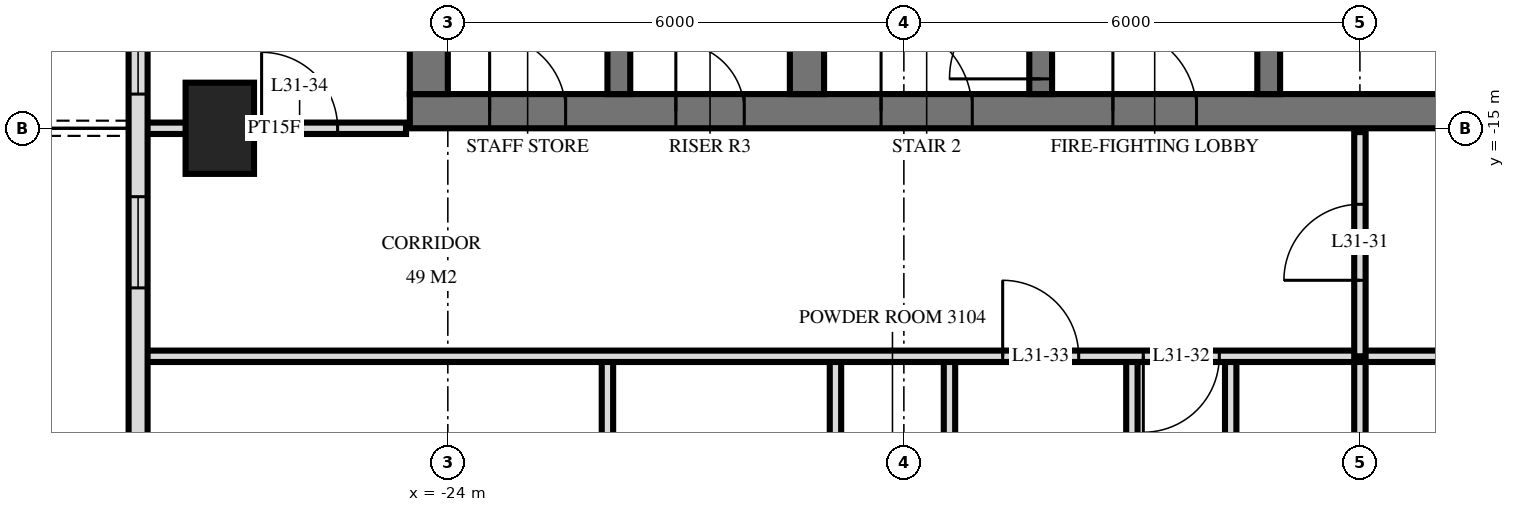
"""IFC4 building model, lengths in metres.
Left out: names, types, materials, properties, quantities, classifications, styles, units other than length and angle.
Written with IfcOpenShell. Run it as: python <this file> out.ifc"""

import sys

from ifc_helpers import new_model, si_unit, direction, frame, frame_2d, origin, origin_2d, place, context, subcontext, project, spatial, rectangle, extrude, element, fill, save


model = new_model("IFC4")
c1 = context("Model", 3, precision=1e-05, world=origin(), true_north=direction((0.0, 1.0)))
c2 = subcontext(c1, "Body", "Model", "MODEL_VIEW")
j1 = project(units=[si_unit("LENGTHUNIT", "METRE"), si_unit("PLANEANGLEUNIT", "RADIAN")], contexts=[c1])
p1 = place(None, origin())
s1 = spatial("IfcSite", under=j1, at=p1, CompositionType="ELEMENT")
p2 = place(p1, origin())
s2 = spatial("IfcBuilding", under=s1, at=p2, CompositionType="ELEMENT")
p3 = place(p2, frame((0.0, 0.0, 123.6)))
s3 = spatial("IfcBuildingStorey", under=s2, at=p3, CompositionType="ELEMENT", Elevation=123.6)
p4 = place(p3, frame((-27.0, -15.0, 0.0), z_axis=(0.0, 0.0, 1.0), x_axis=(0.0, 1.0, 0.0)))
e1 = element("IfcColumn", 1, at=p4, inside=s3, PredefinedType="COLUMN", context=c2, shape_type="SweptSolid", body=[
    extrude(rectangle(XDim=1.2, YDim=0.9, at=origin_2d()), origin(), (0.0, 0.0, 1.0), 3.6),
])
p5 = place(p3, frame((-24.5, -14.775, 0.0), z_axis=(0.0, 0.0, 1.0), x_axis=(1.0, 0.0, 0.0)))
e2 = element("IfcWall", 2, at=p5, inside=s3, PredefinedType="SHEAR", context=c2, shape_type="SweptSolid", body=[
    extrude(rectangle(XDim=14.5, YDim=0.45, at=frame_2d((7.25, 0.0))), origin(), (0.0, 0.0, 1.0), 3.6),
])
p6 = place(p5, frame((6.2, 0.0, 0.0)))
e3 = element("IfcOpeningElement", 3, at=p6, cuts=e2, PredefinedType="OPENING", context=c2, shape_type="SweptSolid", body=[
    extrude(rectangle(XDim=1.2, YDim=2.1, at=frame_2d((0.6, 1.05))), frame((0.0, 0.235, 0.0), z_axis=(0.0, -1.0, 0.0), x_axis=(1.0, 0.0, 0.0)), (0.0, 0.0, 1.0), 0.47),
])
p7 = place(p5, frame((9.25, 0.0, 0.0)))
e4 = element("IfcOpeningElement", 4, at=p7, cuts=e2, PredefinedType="OPENING", context=c2, shape_type="SweptSolid", body=[
    extrude(rectangle(XDim=1.1, YDim=2.1, at=frame_2d((0.55, 1.05))), frame((0.0, 0.235, 0.0), z_axis=(0.0, -1.0, 0.0), x_axis=(1.0, 0.0, 0.0)), (0.0, 0.0, 1.0), 0.47),
])
p8 = place(p5, frame((3.5, 0.0, 0.0)))
e5 = element("IfcOpeningElement", 5, at=p8, cuts=e2, PredefinedType="OPENING", context=c2, shape_type="SweptSolid", body=[
    extrude(rectangle(XDim=0.9, YDim=2.1, at=frame_2d((0.45, 1.05))), frame((0.0, 0.235, 0.0), z_axis=(0.0, -1.0, 0.0), x_axis=(1.0, 0.0, 0.0)), (0.0, 0.0, 1.0), 0.47),
])
p9 = place(p5, frame((1.05, 0.0, 0.0)))
e6 = element("IfcOpeningElement", 6, at=p9, cuts=e2, PredefinedType="OPENING", context=c2, shape_type="SweptSolid", body=[
    extrude(rectangle(XDim=1.0, YDim=2.1, at=frame_2d((0.5, 1.05))), frame((0.0, 0.235, 0.0), z_axis=(0.0, -1.0, 0.0), x_axis=(1.0, 0.0, 0.0)), (0.0, 0.0, 1.0), 0.47),
])
p10 = place(p3, frame((-24.25, -14.55, 0.0), z_axis=(0.0, 0.0, 1.0), x_axis=(0.0, 1.0, 0.0)))
e7 = element("IfcWall", 7, at=p10, inside=s3, PredefinedType="SHEAR", context=c2, shape_type="SweptSolid", body=[
    extrude(rectangle(XDim=14.1, YDim=0.5, at=frame_2d((7.05, 0.0))), origin(), (0.0, 0.0, 1.0), 3.6),
])
p11 = place(p3, frame((-13.2, -14.55, 0.0), z_axis=(0.0, 0.0, 1.0), x_axis=(0.0, 1.0, 0.0)))
e8 = element("IfcWall", 8, at=p11, inside=s3, PredefinedType="SHEAR", context=c2, shape_type="SweptSolid", body=[
    extrude(rectangle(XDim=5.4, YDim=0.3, at=frame_2d((2.7, 0.0))), origin(), (0.0, 0.0, 1.0), 3.6),
])
p12 = place(p11, frame((4.0, 0.0, 0.0)))
e9 = element("IfcOpeningElement", 9, at=p12, cuts=e8, PredefinedType="OPENING", context=c2, shape_type="SweptSolid", body=[
    extrude(rectangle(XDim=1.2, YDim=2.1, at=frame_2d((0.6, 1.05))), frame((0.0, 0.16, 0.0), z_axis=(0.0, -1.0, 0.0), x_axis=(1.0, 0.0, 0.0)), (0.0, 0.0, 1.0), 0.32),
])
p13 = place(p3, frame((-16.2, -14.55, 0.0), z_axis=(0.0, 0.0, 1.0), x_axis=(0.0, 1.0, 0.0)))
e10 = element("IfcWall", 10, at=p13, inside=s3, PredefinedType="SHEAR", context=c2, shape_type="SweptSolid", body=[
    extrude(rectangle(XDim=5.4, YDim=0.3, at=frame_2d((2.7, 0.0))), origin(), (0.0, 0.0, 1.0), 3.6),
])
p14 = place(p13, frame((0.2, 0.0, 0.0)))
e11 = element("IfcOpeningElement", 11, at=p14, cuts=e10, PredefinedType="OPENING", context=c2, shape_type="SweptSolid", body=[
    extrude(rectangle(XDim=1.2, YDim=2.1, at=frame_2d((0.6, 1.05))), frame((0.0, 0.16, 0.0), z_axis=(0.0, -1.0, 0.0), x_axis=(1.0, 0.0, 0.0)), (0.0, 0.0, 1.0), 0.32),
])
p15 = place(p3, frame((-19.275, -14.55, 0.0), z_axis=(0.0, 0.0, 1.0), x_axis=(0.0, 1.0, 0.0)))
e12 = element("IfcWall", 12, at=p15, inside=s3, PredefinedType="SHEAR", context=c2, shape_type="SweptSolid", body=[
    extrude(rectangle(XDim=5.4, YDim=0.45, at=frame_2d((2.7, 0.0))), origin(), (0.0, 0.0, 1.0), 3.6),
])
p16 = place(p3, frame((-21.75, -14.55, 0.0), z_axis=(0.0, 0.0, 1.0), x_axis=(0.0, 1.0, 0.0)))
e13 = element("IfcWall", 13, at=p16, inside=s3, PredefinedType="SHEAR", context=c2, shape_type="SweptSolid", body=[
    extrude(rectangle(XDim=5.4, YDim=0.3, at=frame_2d((2.7, 0.0))), origin(), (0.0, 0.0, 1.0), 3.6),
])
p17 = place(p3, frame((-28.075, -3.325, 0.0), z_axis=(0.0, 0.0, 1.0), x_axis=(0.0, -1.0, 0.0)))
e14 = element("IfcWall", 14, at=p17, inside=s3, PredefinedType="SOLIDWALL", context=c2, shape_type="SweptSolid", body=[
    extrude(rectangle(XDim=25.951, YDim=0.25, at=frame_2d((12.975, 0.0))), origin(), (0.0, 0.0, 1.0), 3.32),
])
p18 = place(p17, frame((6.575, 0.0, 0.0)))
e15 = element("IfcOpeningElement", 15, at=p18, cuts=e14, PredefinedType="OPENING", context=c2, shape_type="SweptSolid", body=[
    extrude(rectangle(XDim=1.8, YDim=2.4, at=frame_2d((0.9, 1.2))), frame((0.0, 0.135, 0.0), z_axis=(0.0, -1.0, 0.0), x_axis=(1.0, 0.0, 0.0)), (0.0, 0.0, 1.0), 0.27),
])
p19 = place(p17, frame((9.425, 0.0, 0.3)))
e16 = element("IfcOpeningElement", 16, at=p19, cuts=e14, PredefinedType="OPENING", context=c2, shape_type="SweptSolid", body=[
    extrude(rectangle(XDim=1.8, YDim=2.1, at=frame_2d((0.9, 1.05))), frame((0.0, 0.135, 0.0), z_axis=(0.0, -1.0, 0.0), x_axis=(1.0, 0.0, 0.0)), (0.0, 0.0, 1.0), 0.27),
])
p20 = place(p17, frame((12.575, 0.0, 0.3)))
e17 = element("IfcOpeningElement", 17, at=p20, cuts=e14, PredefinedType="OPENING", context=c2, shape_type="SweptSolid", body=[
    extrude(rectangle(XDim=1.2, YDim=2.1, at=frame_2d((0.6, 1.05))), frame((0.0, 0.135, 0.0), z_axis=(0.0, -1.0, 0.0), x_axis=(1.0, 0.0, 0.0)), (0.0, 0.0, 1.0), 0.27),
])
p21 = place(p17, frame((15.875, 0.0, 0.0)))
e18 = element("IfcOpeningElement", 18, at=p21, cuts=e14, PredefinedType="OPENING", context=c2, shape_type="SweptSolid", body=[
    extrude(rectangle(XDim=1.8, YDim=2.4, at=frame_2d((0.9, 1.2))), frame((0.0, 0.135, 0.0), z_axis=(0.0, -1.0, 0.0), x_axis=(1.0, 0.0, 0.0)), (0.0, 0.0, 1.0), 0.27),
])
p22 = place(p17, frame((21.075, 0.0, 0.0)))
e19 = element("IfcOpeningElement", 19, at=p22, cuts=e14, PredefinedType="OPENING", context=c2, shape_type="SweptSolid", body=[
    extrude(rectangle(XDim=1.8, YDim=2.4, at=frame_2d((0.9, 1.2))), frame((0.0, 0.135, 0.0), z_axis=(0.0, -1.0, 0.0), x_axis=(1.0, 0.0, 0.0)), (0.0, 0.0, 1.0), 0.27),
])
p23 = place(p17, frame((23.825, 0.0, 0.3)))
e20 = element("IfcOpeningElement", 20, at=p23, cuts=e14, PredefinedType="OPENING", context=c2, shape_type="SweptSolid", body=[
    extrude(rectangle(XDim=1.8, YDim=2.1, at=frame_2d((0.9, 1.05))), frame((0.0, 0.135, 0.0), z_axis=(0.0, -1.0, 0.0), x_axis=(1.0, 0.0, 0.0)), (0.0, 0.0, 1.0), 0.27),
])
p24 = place(p3, frame((-12.0, -18.0, 0.0), z_axis=(0.0, 0.0, 1.0), x_axis=(0.0, 1.0, 0.0)))
e21 = element("IfcWall", 21, at=p24, inside=s3, PredefinedType="PARTITIONING", context=c2, shape_type="SweptSolid", body=[
    extrude(rectangle(XDim=2.95, YDim=0.15, at=frame_2d((1.475, 0.0))), origin(), (0.0, 0.0, 1.0), 3.32),
])
p25 = place(p24, frame((1.0, 0.0, 0.0)))
e22 = element("IfcOpeningElement", 22, at=p25, cuts=e21, PredefinedType="OPENING", context=c2, shape_type="SweptSolid", body=[
    extrude(rectangle(XDim=1.0, YDim=2.1, at=frame_2d((0.5, 1.05))), frame((0.0, 0.085, 0.0), z_axis=(0.0, -1.0, 0.0), x_axis=(1.0, 0.0, 0.0)), (0.0, 0.0, 1.0), 0.17),
])
p26 = place(p3, frame((-12.0, -33.62, 0.0), z_axis=(0.0, 0.0, 1.0), x_axis=(0.0, 1.0, 0.0)))
e23 = element("IfcWall", 23, at=p26, inside=s3, PredefinedType="PARTITIONING", context=c2, shape_type="SweptSolid", body=[
    extrude(rectangle(XDim=15.62, YDim=0.15, at=frame_2d((7.81, 0.0))), origin(), (0.0, 0.0, 1.0), 3.32),
])
p27 = place(p3, frame((-13.7, -23.0, 0.0), z_axis=(0.0, 0.0, 1.0), x_axis=(0.0, 1.0, 0.0)))
e24 = element("IfcWall", 24, at=p27, inside=s3, PredefinedType="PARTITIONING", context=c2, shape_type="SweptSolid", body=[
    extrude(rectangle(XDim=5.0, YDim=0.15, at=frame_2d((2.5, 0.0))), origin(), (0.0, 0.0, 1.0), 3.32),
])
p28 = place(p27, frame((2.12, 0.0, 0.0)))
e25 = element("IfcOpeningElement", 25, at=p28, cuts=e24, PredefinedType="OPENING", context=c2, shape_type="SweptSolid", body=[
    extrude(rectangle(XDim=0.8, YDim=2.1, at=frame_2d((0.4, 1.05))), frame((0.0, 0.085, 0.0), z_axis=(0.0, -1.0, 0.0), x_axis=(1.0, 0.0, 0.0)), (0.0, 0.0, 1.0), 0.17),
])
p29 = place(p3, frame((-15.0, -22.2, 0.0), z_axis=(0.0, 0.0, 1.0), x_axis=(0.0, 1.0, 0.0)))
e26 = element("IfcWall", 26, at=p29, inside=s3, PredefinedType="PARTITIONING", context=c2, shape_type="SweptSolid", body=[
    extrude(rectangle(XDim=4.2, YDim=0.15, at=frame_2d((2.1, 0.0))), origin(), (0.0, 0.0, 1.0), 3.32),
])
p30 = place(p3, frame((-17.4, -22.2, 0.0), z_axis=(0.0, 0.0, 1.0), x_axis=(0.0, 1.0, 0.0)))
e27 = element("IfcWall", 27, at=p30, inside=s3, PredefinedType="PARTITIONING", context=c2, shape_type="SweptSolid", body=[
    extrude(rectangle(XDim=4.2, YDim=0.15, at=frame_2d((2.1, 0.0))), origin(), (0.0, 0.0, 1.0), 3.32),
])
p31 = place(p30, frame((1.58, 0.0, 0.0)))
e28 = element("IfcOpeningElement", 28, at=p31, cuts=e27, PredefinedType="OPENING", context=c2, shape_type="SweptSolid", body=[
    extrude(rectangle(XDim=1.0, YDim=2.1, at=frame_2d((0.5, 1.05))), frame((0.0, 0.085, 0.0), z_axis=(0.0, -1.0, 0.0), x_axis=(1.0, 0.0, 0.0)), (0.0, 0.0, 1.0), 0.17),
])
p32 = place(p3, frame((-18.9, -22.2, 0.0), z_axis=(0.0, 0.0, 1.0), x_axis=(0.0, 1.0, 0.0)))
e29 = element("IfcWall", 29, at=p32, inside=s3, PredefinedType="PLUMBINGWALL", context=c2, shape_type="SweptSolid", body=[
    extrude(rectangle(XDim=4.2, YDim=0.15, at=frame_2d((2.1, 0.0))), origin(), (0.0, 0.0, 1.0), 3.32),
])
p33 = place(p3, frame((-21.9, -22.2, 0.0), z_axis=(0.0, 0.0, 1.0), x_axis=(0.0, 1.0, 0.0)))
e30 = element("IfcWall", 30, at=p33, inside=s3, PredefinedType="PARTITIONING", context=c2, shape_type="SweptSolid", body=[
    extrude(rectangle(XDim=4.2, YDim=0.15, at=frame_2d((2.1, 0.0))), origin(), (0.0, 0.0, 1.0), 3.32),
])
p34 = place(p3, frame((-28.02, -18.0, 0.0), z_axis=(0.0, 0.0, 1.0), x_axis=(1.0, 0.0, 0.0)))
e31 = element("IfcWall", 31, at=p34, inside=s3, PredefinedType="PARTITIONING", context=c2, shape_type="SweptSolid", body=[
    extrude(rectangle(XDim=56.04, YDim=0.15, at=frame_2d((28.02, 0.0))), origin(), (0.0, 0.0, 1.0), 3.32),
])
p35 = place(p34, frame((13.17, 0.0, 0.0)))
e32 = element("IfcOpeningElement", 32, at=p35, cuts=e31, PredefinedType="OPENING", context=c2, shape_type="SweptSolid", body=[
    extrude(rectangle(XDim=1.0, YDim=2.1, at=frame_2d((0.5, 1.05))), frame((0.0, 0.085, 0.0), z_axis=(0.0, -1.0, 0.0), x_axis=(1.0, 0.0, 0.0)), (0.0, 0.0, 1.0), 0.17),
])
p36 = place(p34, frame((11.32, 0.0, 0.0)))
e33 = element("IfcOpeningElement", 33, at=p36, cuts=e31, PredefinedType="OPENING", context=c2, shape_type="SweptSolid", body=[
    extrude(rectangle(XDim=1.0, YDim=2.1, at=frame_2d((0.5, 1.05))), frame((0.0, 0.085, 0.0), z_axis=(0.0, -1.0, 0.0), x_axis=(1.0, 0.0, 0.0)), (0.0, 0.0, 1.0), 0.17),
])
p37 = place(p34, frame((41.87, 0.0, 0.0)))
e34 = element("IfcOpeningElement", 34, at=p37, cuts=e31, PredefinedType="OPENING", context=c2, shape_type="SweptSolid", body=[
    extrude(rectangle(XDim=1.0, YDim=2.1, at=frame_2d((0.5, 1.05))), frame((0.0, 0.085, 0.0), z_axis=(0.0, -1.0, 0.0), x_axis=(1.0, 0.0, 0.0)), (0.0, 0.0, 1.0), 0.17),
])
p38 = place(p34, frame((43.17, 0.0, 0.0)))
e35 = element("IfcOpeningElement", 35, at=p38, cuts=e31, PredefinedType="OPENING", context=c2, shape_type="SweptSolid", body=[
    extrude(rectangle(XDim=1.0, YDim=2.1, at=frame_2d((0.5, 1.05))), frame((0.0, 0.085, 0.0), z_axis=(0.0, -1.0, 0.0), x_axis=(1.0, 0.0, 0.0)), (0.0, 0.0, 1.0), 0.17),
])
p39 = place(p34, frame((46.72, 0.0, 0.0)))
e36 = element("IfcOpeningElement", 36, at=p39, cuts=e31, PredefinedType="OPENING", context=c2, shape_type="SweptSolid", body=[
    extrude(rectangle(XDim=1.0, YDim=2.1, at=frame_2d((0.5, 1.05))), frame((0.0, 0.085, 0.0), z_axis=(0.0, -1.0, 0.0), x_axis=(1.0, 0.0, 0.0)), (0.0, 0.0, 1.0), 0.17),
])
p40 = place(p34, frame((21.52, 0.0, 0.0)))
e37 = element("IfcOpeningElement", 37, at=p40, cuts=e31, PredefinedType="OPENING", context=c2, shape_type="SweptSolid", body=[
    extrude(rectangle(XDim=1.0, YDim=2.1, at=frame_2d((0.5, 1.05))), frame((0.0, 0.085, 0.0), z_axis=(0.0, -1.0, 0.0), x_axis=(1.0, 0.0, 0.0)), (0.0, 0.0, 1.0), 0.17),
])
p41 = place(p34, frame((33.52, 0.0, 0.0)))
e38 = element("IfcOpeningElement", 38, at=p41, cuts=e31, PredefinedType="OPENING", context=c2, shape_type="SweptSolid", body=[
    extrude(rectangle(XDim=1.0, YDim=2.1, at=frame_2d((0.5, 1.05))), frame((0.0, 0.085, 0.0), z_axis=(0.0, -1.0, 0.0), x_axis=(1.0, 0.0, 0.0)), (0.0, 0.0, 1.0), 0.17),
])
p42 = place(p3, frame((-28.02, -15.0, 0.0), z_axis=(0.0, 0.0, 1.0), x_axis=(1.0, 0.0, 0.0)))
e39 = element("IfcWall", 39, at=p42, inside=s3, PredefinedType="PARTITIONING", context=c2, shape_type="SweptSolid", body=[
    extrude(rectangle(XDim=3.47, YDim=0.15, at=frame_2d((1.735, 0.0))), origin(), (0.0, 0.0, 1.0), 3.32),
])
p43 = place(p42, frame((1.57, 0.0, 0.0)))
e40 = element("IfcOpeningElement", 40, at=p43, cuts=e39, PredefinedType="OPENING", context=c2, shape_type="SweptSolid", body=[
    extrude(rectangle(XDim=1.0, YDim=2.1, at=frame_2d((0.5, 1.05))), frame((0.0, 0.085, 0.0), z_axis=(0.0, -1.0, 0.0), x_axis=(1.0, 0.0, 0.0)), (0.0, 0.0, 1.0), 0.17),
])
p44 = place(p19, origin())
e41 = element("IfcWindow", 41, at=p44, inside=s3, PartitioningType="SINGLE_PANEL", PredefinedType="WINDOW", context=c2, shape_type="SweptSolid", body=[
    extrude(rectangle(XDim=1.8, YDim=2.1, at=frame_2d((0.9, 1.05))), frame((0.0, 0.03, 0.0), z_axis=(0.0, -1.0, 0.0), x_axis=(1.0, 0.0, 0.0)), (0.0, 0.0, 1.0), 0.06),
])
fill(e16, e41)
p45 = place(p20, origin())
e42 = element("IfcWindow", 42, at=p45, inside=s3, PartitioningType="SINGLE_PANEL", PredefinedType="WINDOW", context=c2, shape_type="SweptSolid", body=[
    extrude(rectangle(XDim=1.2, YDim=2.1, at=frame_2d((0.6, 1.05))), frame((0.0, 0.03, 0.0), z_axis=(0.0, -1.0, 0.0), x_axis=(1.0, 0.0, 0.0)), (0.0, 0.0, 1.0), 0.06),
])
fill(e17, e42)
p46 = place(p6, origin())
e43 = element("IfcDoor", 43, at=p46, inside=s3, OperationType="SINGLE_SWING_RIGHT", PredefinedType="DOOR", context=c2, shape_type="SweptSolid", body=[
    extrude(rectangle(XDim=1.2, YDim=2.1, at=frame_2d((0.6, 1.05))), frame((0.0, 0.025, 0.0), z_axis=(0.0, -1.0, 0.0), x_axis=(1.0, 0.0, 0.0)), (0.0, 0.0, 1.0), 0.05),
])
fill(e3, e43)
p47 = place(p7, origin())
e44 = element("IfcDoor", 44, at=p47, inside=s3, OperationType="SINGLE_SWING_RIGHT", PredefinedType="DOOR", context=c2, shape_type="SweptSolid", body=[
    extrude(rectangle(XDim=1.1, YDim=2.1, at=frame_2d((0.55, 1.05))), frame((0.0, 0.025, 0.0), z_axis=(0.0, -1.0, 0.0), x_axis=(1.0, 0.0, 0.0)), (0.0, 0.0, 1.0), 0.05),
])
fill(e4, e44)
p48 = place(p8, origin())
e45 = element("IfcDoor", 45, at=p48, inside=s3, OperationType="SINGLE_SWING_RIGHT", PredefinedType="DOOR", context=c2, shape_type="SweptSolid", body=[
    extrude(rectangle(XDim=0.9, YDim=2.1, at=frame_2d((0.45, 1.05))), frame((0.0, 0.025, 0.0), z_axis=(0.0, -1.0, 0.0), x_axis=(1.0, 0.0, 0.0)), (0.0, 0.0, 1.0), 0.05),
])
fill(e5, e45)
p49 = place(p9, origin())
e46 = element("IfcDoor", 46, at=p49, inside=s3, OperationType="SINGLE_SWING_RIGHT", PredefinedType="DOOR", context=c2, shape_type="SweptSolid", body=[
    extrude(rectangle(XDim=1.0, YDim=2.1, at=frame_2d((0.5, 1.05))), frame((0.0, 0.025, 0.0), z_axis=(0.0, -1.0, 0.0), x_axis=(1.0, 0.0, 0.0)), (0.0, 0.0, 1.0), 0.05),
])
fill(e6, e46)
p50 = place(p14, origin())
e47 = element("IfcDoor", 47, at=p50, inside=s3, OperationType="SINGLE_SWING_RIGHT", PredefinedType="DOOR", context=c2, shape_type="SweptSolid", body=[
    extrude(rectangle(XDim=1.2, YDim=2.1, at=frame_2d((0.6, 1.05))), frame((0.0, 0.025, 0.0), z_axis=(0.0, -1.0, 0.0), x_axis=(1.0, 0.0, 0.0)), (0.0, 0.0, 1.0), 0.05),
])
fill(e11, e47)
p51 = place(p25, origin())
e48 = element("IfcDoor", 48, at=p51, inside=s3, OperationType="SINGLE_SWING_RIGHT", PredefinedType="DOOR", context=c2, shape_type="SweptSolid", body=[
    extrude(rectangle(XDim=1.0, YDim=2.1, at=frame_2d((0.5, 1.05))), frame((0.0, 0.025, 0.0), z_axis=(0.0, -1.0, 0.0), x_axis=(1.0, 0.0, 0.0)), (0.0, 0.0, 1.0), 0.05),
])
fill(e22, e48)
p52 = place(p35, frame((0.5, 0.0, 0.0), z_axis=(0.0, 0.0, 1.0), x_axis=(-1.0, 0.0, 0.0)))
e49 = element("IfcDoor", 49, at=p52, inside=s3, OperationType="SINGLE_SWING_LEFT", PredefinedType="DOOR", context=c2, shape_type="SweptSolid", body=[
    extrude(rectangle(XDim=1.0, YDim=2.1, at=frame_2d((0.0, 1.05))), frame((0.0, -0.025, 0.0), z_axis=(0.0, 1.0, 0.0), x_axis=(-1.0, 0.0, 0.0)), (0.0, 0.0, 1.0), 0.05),
])
fill(e32, e49)
p53 = place(p36, origin())
e50 = element("IfcDoor", 50, at=p53, inside=s3, OperationType="SINGLE_SWING_RIGHT", PredefinedType="DOOR", context=c2, shape_type="SweptSolid", body=[
    extrude(rectangle(XDim=1.0, YDim=2.1, at=frame_2d((0.5, 1.05))), frame((0.0, 0.025, 0.0), z_axis=(0.0, -1.0, 0.0), x_axis=(1.0, 0.0, 0.0)), (0.0, 0.0, 1.0), 0.05),
])
fill(e33, e50)
p54 = place(p43, origin())
e51 = element("IfcDoor", 51, at=p54, inside=s3, OperationType="SINGLE_SWING_RIGHT", PredefinedType="DOOR", context=c2, shape_type="SweptSolid", body=[
    extrude(rectangle(XDim=1.0, YDim=2.1, at=frame_2d((0.5, 1.05))), frame((0.0, 0.025, 0.0), z_axis=(0.0, -1.0, 0.0), x_axis=(1.0, 0.0, 0.0)), (0.0, 0.0, 1.0), 0.05),
])
fill(e40, e51)
save(model, sys.argv[1])
